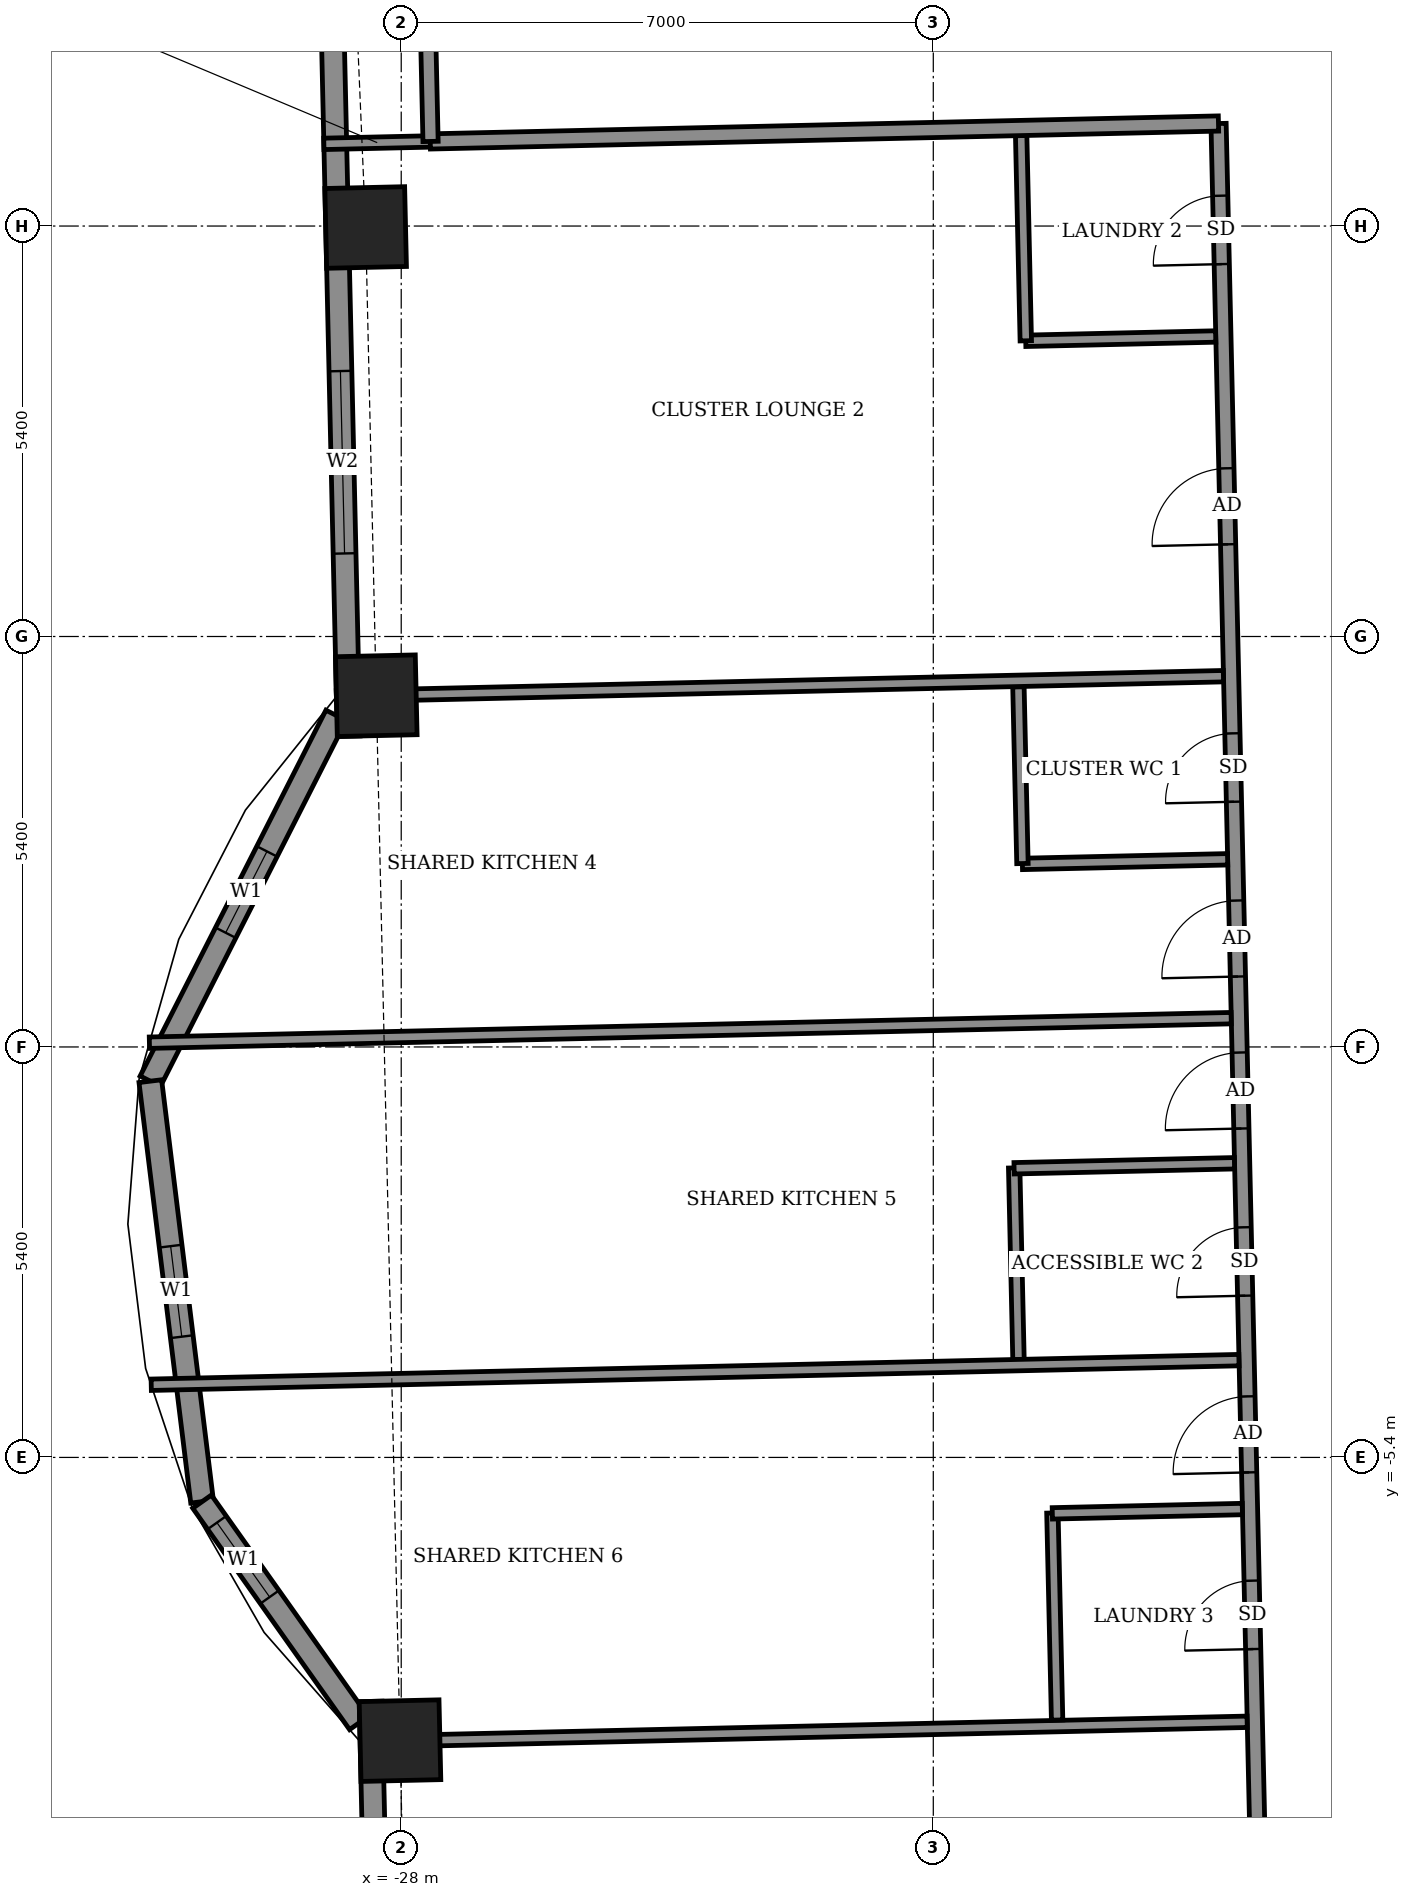
"""IFC4 building model, lengths in metres.
Left out: names, types, materials, properties, quantities, classifications, styles, units other than length and angle.
Written with IfcOpenShell. Run it as: python <this file> out.ifc"""

import sys

from ifc_helpers import new_model, si_unit, direction, frame, frame_2d, origin, origin_2d, place, context, subcontext, project, spatial, rectangle, extrude, element, fill, save


model = new_model("IFC4")
c1 = context("Model", 3, precision=1e-05, world=origin(), true_north=direction((0.0, 1.0)))
c2 = subcontext(c1, "Body", "Model", "MODEL_VIEW")
j1 = project(units=[si_unit("LENGTHUNIT", "METRE"), si_unit("PLANEANGLEUNIT", "RADIAN")], contexts=[c1])
p1 = place(None, origin())
s1 = spatial("IfcSite", under=j1, at=p1, CompositionType="ELEMENT")
p2 = place(p1, origin())
s2 = spatial("IfcBuilding", under=s1, at=p2, CompositionType="ELEMENT")
p3 = place(p2, frame((0.0, 0.0, 245.5)))
s3 = spatial("IfcBuildingStorey", under=s2, at=p3, CompositionType="ELEMENT", Elevation=245.5)
for number, where, z_axis, x_axis in (
    (1, (-28.016, -9.126, -0.55), (0.0, 0.0, 1.0), (0.023, -1.0, 0.0)),
    (2, (-28.468, 10.781, -0.55), (0.0, 0.0, 1.0), (0.023, -1.0, 0.0)),
    (3, (-28.328, 4.621, -0.55), (0.0, 0.0, 1.0), (0.023, -1.0, 0.0)),
):
    element("IfcColumn", number, at=place(p3, frame(where, z_axis=z_axis, x_axis=x_axis)), inside=s3, PredefinedType="COLUMN", context=c2, shape_type="SweptSolid", body=[
        extrude(rectangle(XDim=1.05, YDim=1.05, at=origin_2d()), origin(), (0.0, 0.0, 1.0), 3.6),
    ])
p4 = place(p3, frame((-28.979, 16.784, 0.0), z_axis=(0.0, 0.0, 1.0), x_axis=(0.022685159264, -0.999742658662, 0.0)))
e4 = element("IfcWall", 4, at=p4, inside=s3, PredefinedType="SOLIDWALL", context=c2, shape_type="SweptSolid", body=[
    extrude(rectangle(XDim=12.699, YDim=0.3, at=frame_2d((6.35, 0.0))), origin(), (0.0, 0.0, 1.0), 2.55),
])
p5 = place(p4, frame((2.035, 0.0, 0.0)))
e5 = element("IfcOpeningElement", 5, at=p5, cuts=e4, PredefinedType="OPENING", context=c2, shape_type="SweptSolid", body=[
    extrude(rectangle(XDim=1.5, YDim=2.4, at=frame_2d((0.75, 1.2))), frame((0.0, 0.16, 0.0), z_axis=(0.0, -1.0, 0.0), x_axis=(1.0, 0.0, 0.0)), (0.0, 0.0, 1.0), 0.32),
])
p6 = place(p4, frame((7.894, 0.0, 0.9)))
e6 = element("IfcOpeningElement", 6, at=p6, cuts=e4, PredefinedType="OPENING", context=c2, shape_type="SweptSolid", body=[
    extrude(rectangle(XDim=2.4, YDim=1.5, at=frame_2d((1.2, 0.75))), frame((0.0, 0.16, 0.0), z_axis=(0.0, -1.0, 0.0), x_axis=(1.0, 0.0, 0.0)), (0.0, 0.0, 1.0), 0.32),
])
p7 = place(p3, frame((-28.857, 4.363, 0.0), z_axis=(0.0, 0.0, 1.0), x_axis=(-0.45277700056, -0.891623792731, 0.0)))
e7 = element("IfcWall", 7, at=p7, inside=s3, PredefinedType="SOLIDWALL", context=c2, shape_type="SweptSolid", body=[
    extrude(rectangle(XDim=5.398, YDim=0.3, at=frame_2d((2.699, 0.0))), origin(), (0.0, 0.0, 1.0), 3.05),
])
p8 = place(p7, frame((2.008, 0.0, 0.9)))
e8 = element("IfcOpeningElement", 8, at=p8, cuts=e7, PredefinedType="OPENING", context=c2, shape_type="SweptSolid", body=[
    extrude(rectangle(XDim=1.2, YDim=1.5, at=frame_2d((0.6, 0.75))), frame((0.0, 0.16, 0.0), z_axis=(0.0, -1.0, 0.0), x_axis=(1.0, 0.0, 0.0)), (0.0, 0.0, 1.0), 0.32),
])
p9 = place(p3, frame((-31.301, -0.45, 0.0), z_axis=(0.0, 0.0, 1.0), x_axis=(0.122163831021, -0.992509948761, 0.0)))
e9 = element("IfcWall", 9, at=p9, inside=s3, PredefinedType="SOLIDWALL", context=c2, shape_type="SweptSolid", body=[
    extrude(rectangle(XDim=5.574, YDim=0.3, at=frame_2d((2.787, 0.0))), origin(), (0.0, 0.0, 1.0), 3.05),
])
p10 = place(p9, frame((2.187, 0.0, 0.9)))
e10 = element("IfcOpeningElement", 10, at=p10, cuts=e9, PredefinedType="OPENING", context=c2, shape_type="SweptSolid", body=[
    extrude(rectangle(XDim=1.2, YDim=1.5, at=frame_2d((0.6, 0.75))), frame((0.0, 0.16, 0.0), z_axis=(0.0, -1.0, 0.0), x_axis=(1.0, 0.0, 0.0)), (0.0, 0.0, 1.0), 0.32),
])
p11 = place(p3, frame((-30.62, -5.982, 0.0), z_axis=(0.0, 0.0, 1.0), x_axis=(0.578108441206, -0.815959943996, 0.0)))
e11 = element("IfcWall", 11, at=p11, inside=s3, PredefinedType="SOLIDWALL", context=c2, shape_type="SweptSolid", body=[
    extrude(rectangle(XDim=3.569, YDim=0.3, at=frame_2d((1.784, 0.0))), origin(), (0.0, 0.0, 1.0), 3.05),
])
p12 = place(p11, frame((0.338, 0.0, 0.9)))
e12 = element("IfcOpeningElement", 12, at=p12, cuts=e11, PredefinedType="OPENING", context=c2, shape_type="SweptSolid", body=[
    extrude(rectangle(XDim=1.2, YDim=1.5, at=frame_2d((0.6, 0.75))), frame((0.0, 0.16, 0.0), z_axis=(0.0, -1.0, 0.0), x_axis=(1.0, 0.0, 0.0)), (0.0, 0.0, 1.0), 0.32),
])
p13 = place(p3, frame((-28.403, -8.61, 0.0), z_axis=(0.0, 0.0, 1.0), x_axis=(0.022680342038, -0.999742767958, 0.0)))
e13 = element("IfcWall", 13, at=p13, inside=s3, PredefinedType="SOLIDWALL", context=c2, shape_type="SweptSolid", body=[
    extrude(rectangle(XDim=13.1, YDim=0.3, at=frame_2d((6.55, 0.0))), origin(), (0.0, 0.0, 1.0), 2.55),
])
p14 = place(p13, frame((1.937, 0.0, 0.0)))
e14 = element("IfcOpeningElement", 14, at=p14, cuts=e13, PredefinedType="OPENING", context=c2, shape_type="SweptSolid", body=[
    extrude(rectangle(XDim=1.5, YDim=2.4, at=frame_2d((0.75, 1.2))), frame((0.0, 0.16, 0.0), z_axis=(0.0, -1.0, 0.0), x_axis=(1.0, 0.0, 0.0)), (0.0, 0.0, 1.0), 0.32),
])
p15 = place(p13, frame((8.611, 0.0, 0.9)))
e15 = element("IfcOpeningElement", 15, at=p15, cuts=e13, PredefinedType="OPENING", context=c2, shape_type="SweptSolid", body=[
    extrude(rectangle(XDim=2.4, YDim=1.5, at=frame_2d((1.2, 0.75))), frame((0.0, 0.16, 0.0), z_axis=(0.0, -1.0, 0.0), x_axis=(1.0, 0.0, 0.0)), (0.0, 0.0, 1.0), 0.32),
])
p16 = place(p3, frame((-16.678, -12.919, 0.0), z_axis=(0.0, 0.0, 1.0), x_axis=(-0.022696191528, 0.999742408268, 0.0)))
e16 = element("IfcWall", 16, at=p16, inside=s3, PredefinedType="PARTITIONING", context=c2, shape_type="SweptSolid", body=[
    extrude(rectangle(XDim=25.074, YDim=0.2, at=frame_2d((12.537, 0.0))), origin(), (0.0, 0.0, 1.0), 3.05),
])
p17 = place(p16, frame((19.537, 0.0, 0.0)))
e17 = element("IfcOpeningElement", 17, at=p17, cuts=e16, PredefinedType="OPENING", context=c2, shape_type="SweptSolid", body=[
    extrude(rectangle(XDim=1.0, YDim=2.1, at=frame_2d((0.5, 1.05))), frame((0.0, 0.11, 0.0), z_axis=(0.0, -1.0, 0.0), x_axis=(1.0, 0.0, 0.0)), (0.0, 0.0, 1.0), 0.22),
])
p18 = place(p16, frame((23.224, 0.0, 0.0)))
e18 = element("IfcOpeningElement", 18, at=p18, cuts=e16, PredefinedType="OPENING", context=c2, shape_type="SweptSolid", body=[
    extrude(rectangle(XDim=0.9, YDim=2.1, at=frame_2d((0.45, 1.05))), frame((0.0, 0.11, 0.0), z_axis=(0.0, -1.0, 0.0), x_axis=(1.0, 0.0, 0.0)), (0.0, 0.0, 1.0), 0.22),
])
p19 = place(p16, frame((13.849, 0.0, 0.0)))
e19 = element("IfcOpeningElement", 19, at=p19, cuts=e16, PredefinedType="OPENING", context=c2, shape_type="SweptSolid", body=[
    extrude(rectangle(XDim=1.0, YDim=2.1, at=frame_2d((0.5, 1.05))), frame((0.0, 0.11, 0.0), z_axis=(0.0, -1.0, 0.0), x_axis=(1.0, 0.0, 0.0)), (0.0, 0.0, 1.0), 0.22),
])
p20 = place(p16, frame((16.149, 0.0, 0.0)))
e20 = element("IfcOpeningElement", 20, at=p20, cuts=e16, PredefinedType="OPENING", context=c2, shape_type="SweptSolid", body=[
    extrude(rectangle(XDim=0.9, YDim=2.1, at=frame_2d((0.45, 1.05))), frame((0.0, 0.11, 0.0), z_axis=(0.0, -1.0, 0.0), x_axis=(1.0, 0.0, 0.0)), (0.0, 0.0, 1.0), 0.22),
])
p21 = place(p16, frame((11.849, 0.0, 0.0)))
e21 = element("IfcOpeningElement", 21, at=p21, cuts=e16, PredefinedType="OPENING", context=c2, shape_type="SweptSolid", body=[
    extrude(rectangle(XDim=1.0, YDim=2.1, at=frame_2d((0.5, 1.05))), frame((0.0, 0.11, 0.0), z_axis=(0.0, -1.0, 0.0), x_axis=(1.0, 0.0, 0.0)), (0.0, 0.0, 1.0), 0.22),
])
p22 = place(p16, frame((9.649, 0.0, 0.0)))
e22 = element("IfcOpeningElement", 22, at=p22, cuts=e16, PredefinedType="OPENING", context=c2, shape_type="SweptSolid", body=[
    extrude(rectangle(XDim=0.9, YDim=2.1, at=frame_2d((0.45, 1.05))), frame((0.0, 0.11, 0.0), z_axis=(0.0, -1.0, 0.0), x_axis=(1.0, 0.0, 0.0)), (0.0, 0.0, 1.0), 0.22),
])
p23 = place(p16, frame((7.324, 0.0, 0.0)))
e23 = element("IfcOpeningElement", 23, at=p23, cuts=e16, PredefinedType="OPENING", context=c2, shape_type="SweptSolid", body=[
    extrude(rectangle(XDim=1.0, YDim=2.1, at=frame_2d((0.5, 1.05))), frame((0.0, 0.11, 0.0), z_axis=(0.0, -1.0, 0.0), x_axis=(1.0, 0.0, 0.0)), (0.0, 0.0, 1.0), 0.22),
])
p24 = place(p16, frame((4.999, 0.0, 0.0)))
e24 = element("IfcOpeningElement", 24, at=p24, cuts=e16, PredefinedType="OPENING", context=c2, shape_type="SweptSolid", body=[
    extrude(rectangle(XDim=0.9, YDim=2.1, at=frame_2d((0.45, 1.05))), frame((0.0, 0.11, 0.0), z_axis=(0.0, -1.0, 0.0), x_axis=(1.0, 0.0, 0.0)), (0.0, 0.0, 1.0), 0.22),
])
p25 = place(p3, frame((-28.241, -9.136, 0.0), z_axis=(0.0, 0.0, 1.0), x_axis=(0.999742533279, 0.022690684282, 0.0)))
e25 = element("IfcWall", 25, at=p25, inside=s3, PredefinedType="PARTITIONING", context=c2, shape_type="SweptSolid", body=[
    extrude(rectangle(XDim=11.373, YDim=0.15, at=frame_2d((5.687, 0.0))), origin(), (0.0, 0.0, 1.0), 3.05),
])
p26 = place(p3, frame((-19.371, -8.855, 0.0), z_axis=(0.0, 0.0, 1.0), x_axis=(-0.022760079124, 0.999740955847, 0.0)))
e26 = element("IfcWall", 26, at=p26, inside=s3, PredefinedType="PARTITIONING", context=c2, shape_type="SweptSolid", body=[
    extrude(rectangle(XDim=2.725, YDim=0.15, at=frame_2d((1.362, 0.0))), origin(), (0.0, 0.0, 1.0), 3.05),
])
p27 = place(p3, frame((-19.434, -6.136, 0.0), z_axis=(0.0, 0.0, 1.0), x_axis=(0.999741230352, 0.02274801823, 0.0)))
e27 = element("IfcWall", 27, at=p27, inside=s3, PredefinedType="PARTITIONING", context=c2, shape_type="SweptSolid", body=[
    extrude(rectangle(XDim=2.501, YDim=0.15, at=frame_2d((1.25, 0.0))), origin(), (0.0, 0.0, 1.0), 3.05),
])
p28 = place(p3, frame((-19.879, -4.115, 0.0), z_axis=(0.0, 0.0, 1.0), x_axis=(-0.022629142889, 0.99974392816, 0.0)))
e28 = element("IfcWall", 28, at=p28, inside=s3, PredefinedType="PARTITIONING", context=c2, shape_type="SweptSolid", body=[
    extrude(rectangle(XDim=2.525, YDim=0.15, at=frame_2d((1.262, 0.0))), origin(), (0.0, 0.0, 1.0), 3.05),
])
p29 = place(p3, frame((-31.289, -4.444, 0.0), z_axis=(0.0, 0.0, 1.0), x_axis=(0.99974382177, 0.022633842623, 0.0)))
e29 = element("IfcWall", 29, at=p29, inside=s3, PredefinedType="PARTITIONING", context=c2, shape_type="SweptSolid", body=[
    extrude(rectangle(XDim=14.314, YDim=0.15, at=frame_2d((7.157, 0.0))), origin(), (0.0, 0.0, 1.0), 2.05),
])
p30 = place(p3, frame((-19.937, -1.596, 0.0), z_axis=(0.0, 0.0, 1.0), x_axis=(0.999741574676, 0.022732880677, 0.0)))
e30 = element("IfcWall", 30, at=p30, inside=s3, PredefinedType="PARTITIONING", context=c2, shape_type="SweptSolid", body=[
    extrude(rectangle(XDim=2.9, YDim=0.15, at=frame_2d((1.45, 0.0))), origin(), (0.0, 0.0, 1.0), 3.05),
])
p31 = place(p3, frame((-31.313, 0.056, 0.0), z_axis=(0.0, 0.0, 1.0), x_axis=(0.999742561055, 0.022689460464, 0.0)))
e31 = element("IfcWall", 31, at=p31, inside=s3, PredefinedType="PARTITIONING", context=c2, shape_type="SweptSolid", body=[
    extrude(rectangle(XDim=14.236, YDim=0.15, at=frame_2d((7.118, 0.0))), origin(), (0.0, 0.0, 1.0), 2.05),
])
p32 = place(p3, frame((-19.828, 2.408, 0.0), z_axis=(0.0, 0.0, 1.0), x_axis=(0.99974458177, 0.022600248254, 0.0)))
e32 = element("IfcWall", 32, at=p32, inside=s3, PredefinedType="PARTITIONING", context=c2, shape_type="SweptSolid", body=[
    extrude(rectangle(XDim=2.701, YDim=0.15, at=frame_2d((1.35, 0.0))), origin(), (0.0, 0.0, 1.0), 3.05),
])
p33 = place(p3, frame((-19.827, 2.413, 0.0), z_axis=(0.0, 0.0, 1.0), x_axis=(-0.02279059109, 0.999740260747, 0.0)))
e33 = element("IfcWall", 33, at=p33, inside=s3, PredefinedType="PARTITIONING", context=c2, shape_type="SweptSolid", body=[
    extrude(rectangle(XDim=2.324, YDim=0.15, at=frame_2d((1.162, 0.0))), origin(), (0.0, 0.0, 1.0), 3.05),
])
p34 = place(p3, frame((-28.853, 4.613, 0.0), z_axis=(0.0, 0.0, 1.0), x_axis=(0.999742483, 0.022692899457, 0.0)))
e34 = element("IfcWall", 34, at=p34, inside=s3, PredefinedType="PARTITIONING", context=c2, shape_type="SweptSolid", body=[
    extrude(rectangle(XDim=11.673, YDim=0.15, at=frame_2d((5.836, 0.0))), origin(), (0.0, 0.0, 1.0), 3.05),
])
p35 = place(p3, frame((-19.784, 9.29, 0.0), z_axis=(0.0, 0.0, 1.0), x_axis=(0.999741028149, 0.022756903044, 0.0)))
e35 = element("IfcWall", 35, at=p35, inside=s3, PredefinedType="PARTITIONING", context=c2, shape_type="SweptSolid", body=[
    extrude(rectangle(XDim=2.5, YDim=0.15, at=frame_2d((1.25, 0.0))), origin(), (0.0, 0.0, 1.0), 3.05),
])
p36 = place(p3, frame((-19.783, 9.29, 0.0), z_axis=(0.0, 0.0, 1.0), x_axis=(-0.022600248254, 0.99974458177, 0.0)))
e36 = element("IfcWall", 36, at=p36, inside=s3, PredefinedType="PARTITIONING", context=c2, shape_type="SweptSolid", body=[
    extrude(rectangle(XDim=2.701, YDim=0.15, at=frame_2d((1.35, 0.0))), origin(), (0.0, 0.0, 1.0), 3.05),
])
p37 = place(p3, frame((-29.018, 11.881, 0.0), z_axis=(0.0, 0.0, 1.0), x_axis=(0.999740667531, 0.022772739949, 0.0)))
e37 = element("IfcWall", 37, at=p37, inside=s3, PredefinedType="PARTITIONING", context=c2, shape_type="SweptSolid", body=[
    extrude(rectangle(XDim=1.404, YDim=0.15, at=frame_2d((0.702, 0.0))), origin(), (0.0, 0.0, 1.0), 2.55),
])
p38 = place(p3, frame((-27.618, 11.913, 0.0), z_axis=(0.0, 0.0, 1.0), x_axis=(0.999741483035, 0.022736910479, 0.0)))
e38 = element("IfcWall", 38, at=p38, inside=s3, PredefinedType="PARTITIONING", context=c2, shape_type="SweptSolid", body=[
    extrude(rectangle(XDim=10.373, YDim=0.2, at=frame_2d((5.186, 0.0))), origin(), (0.0, 0.0, 1.0), 3.05),
])
p39 = place(p3, frame((-27.614, 11.913, 0.0), z_axis=(0.0, 0.0, 1.0), x_axis=(-0.022617910375, 0.999744182344, 0.0)))
e39 = element("IfcWall", 39, at=p39, inside=s3, PredefinedType="PARTITIONING", context=c2, shape_type="SweptSolid", body=[
    extrude(rectangle(XDim=1.5, YDim=0.2, at=frame_2d((0.75, 0.0))), origin(), (0.0, 0.0, 1.0), 3.05),
])
p40 = place(p6, origin())
e40 = element("IfcWindow", 40, at=p40, inside=s3, PartitioningType="DOUBLE_PANEL_VERTICAL", PredefinedType="WINDOW", context=c2, shape_type="SweptSolid", body=[
    extrude(rectangle(XDim=2.4, YDim=1.5, at=frame_2d((1.2, 0.75))), frame((0.0, 0.03, 0.0), z_axis=(0.0, -1.0, 0.0), x_axis=(1.0, 0.0, 0.0)), (0.0, 0.0, 1.0), 0.06),
])
fill(e6, e40)
p41 = place(p8, origin())
e41 = element("IfcWindow", 41, at=p41, inside=s3, PartitioningType="SINGLE_PANEL", PredefinedType="WINDOW", context=c2, shape_type="SweptSolid", body=[
    extrude(rectangle(XDim=1.2, YDim=1.5, at=frame_2d((0.6, 0.75))), frame((0.0, 0.03, 0.0), z_axis=(0.0, -1.0, 0.0), x_axis=(1.0, 0.0, 0.0)), (0.0, 0.0, 1.0), 0.06),
])
fill(e8, e41)
p42 = place(p10, origin())
e42 = element("IfcWindow", 42, at=p42, inside=s3, PartitioningType="SINGLE_PANEL", PredefinedType="WINDOW", context=c2, shape_type="SweptSolid", body=[
    extrude(rectangle(XDim=1.2, YDim=1.5, at=frame_2d((0.6, 0.75))), frame((0.0, 0.03, 0.0), z_axis=(0.0, -1.0, 0.0), x_axis=(1.0, 0.0, 0.0)), (0.0, 0.0, 1.0), 0.06),
])
fill(e10, e42)
p43 = place(p12, origin())
e43 = element("IfcWindow", 43, at=p43, inside=s3, PartitioningType="SINGLE_PANEL", PredefinedType="WINDOW", context=c2, shape_type="SweptSolid", body=[
    extrude(rectangle(XDim=1.2, YDim=1.5, at=frame_2d((0.6, 0.75))), frame((0.0, 0.03, 0.0), z_axis=(0.0, -1.0, 0.0), x_axis=(1.0, 0.0, 0.0)), (0.0, 0.0, 1.0), 0.06),
])
fill(e12, e43)
p44 = place(p17, origin())
e44 = element("IfcDoor", 44, at=p44, inside=s3, OperationType="SINGLE_SWING_LEFT", PredefinedType="DOOR", context=c2, shape_type="SweptSolid", body=[
    extrude(rectangle(XDim=1.0, YDim=2.1, at=frame_2d((0.5, 1.05))), frame((0.0, 0.025, 0.0), z_axis=(0.0, -1.0, 0.0), x_axis=(1.0, 0.0, 0.0)), (0.0, 0.0, 1.0), 0.05),
])
fill(e17, e44)
p45 = place(p18, origin())
e45 = element("IfcDoor", 45, at=p45, inside=s3, OperationType="SINGLE_SWING_LEFT", PredefinedType="DOOR", context=c2, shape_type="SweptSolid", body=[
    extrude(rectangle(XDim=0.9, YDim=2.1, at=frame_2d((0.45, 1.05))), frame((0.0, 0.025, 0.0), z_axis=(0.0, -1.0, 0.0), x_axis=(1.0, 0.0, 0.0)), (0.0, 0.0, 1.0), 0.05),
])
fill(e18, e45)
p46 = place(p19, origin())
e46 = element("IfcDoor", 46, at=p46, inside=s3, OperationType="SINGLE_SWING_RIGHT", PredefinedType="DOOR", context=c2, shape_type="SweptSolid", body=[
    extrude(rectangle(XDim=1.0, YDim=2.1, at=frame_2d((0.5, 1.05))), frame((0.0, 0.025, 0.0), z_axis=(0.0, -1.0, 0.0), x_axis=(1.0, 0.0, 0.0)), (0.0, 0.0, 1.0), 0.05),
])
fill(e19, e46)
p47 = place(p20, origin())
e47 = element("IfcDoor", 47, at=p47, inside=s3, OperationType="SINGLE_SWING_RIGHT", PredefinedType="DOOR", context=c2, shape_type="SweptSolid", body=[
    extrude(rectangle(XDim=0.9, YDim=2.1, at=frame_2d((0.45, 1.05))), frame((0.0, 0.025, 0.0), z_axis=(0.0, -1.0, 0.0), x_axis=(1.0, 0.0, 0.0)), (0.0, 0.0, 1.0), 0.05),
])
fill(e20, e47)
p48 = place(p21, origin())
e48 = element("IfcDoor", 48, at=p48, inside=s3, OperationType="SINGLE_SWING_LEFT", PredefinedType="DOOR", context=c2, shape_type="SweptSolid", body=[
    extrude(rectangle(XDim=1.0, YDim=2.1, at=frame_2d((0.5, 1.05))), frame((0.0, 0.025, 0.0), z_axis=(0.0, -1.0, 0.0), x_axis=(1.0, 0.0, 0.0)), (0.0, 0.0, 1.0), 0.05),
])
fill(e21, e48)
p49 = place(p22, origin())
e49 = element("IfcDoor", 49, at=p49, inside=s3, OperationType="SINGLE_SWING_LEFT", PredefinedType="DOOR", context=c2, shape_type="SweptSolid", body=[
    extrude(rectangle(XDim=0.9, YDim=2.1, at=frame_2d((0.45, 1.05))), frame((0.0, 0.025, 0.0), z_axis=(0.0, -1.0, 0.0), x_axis=(1.0, 0.0, 0.0)), (0.0, 0.0, 1.0), 0.05),
])
fill(e22, e49)
p50 = place(p23, origin())
e50 = element("IfcDoor", 50, at=p50, inside=s3, OperationType="SINGLE_SWING_RIGHT", PredefinedType="DOOR", context=c2, shape_type="SweptSolid", body=[
    extrude(rectangle(XDim=1.0, YDim=2.1, at=frame_2d((0.5, 1.05))), frame((0.0, 0.025, 0.0), z_axis=(0.0, -1.0, 0.0), x_axis=(1.0, 0.0, 0.0)), (0.0, 0.0, 1.0), 0.05),
])
fill(e23, e50)
p51 = place(p24, origin())
e51 = element("IfcDoor", 51, at=p51, inside=s3, OperationType="SINGLE_SWING_RIGHT", PredefinedType="DOOR", context=c2, shape_type="SweptSolid", body=[
    extrude(rectangle(XDim=0.9, YDim=2.1, at=frame_2d((0.45, 1.05))), frame((0.0, 0.025, 0.0), z_axis=(0.0, -1.0, 0.0), x_axis=(1.0, 0.0, 0.0)), (0.0, 0.0, 1.0), 0.05),
])
fill(e24, e51)
save(model, sys.argv[1])
